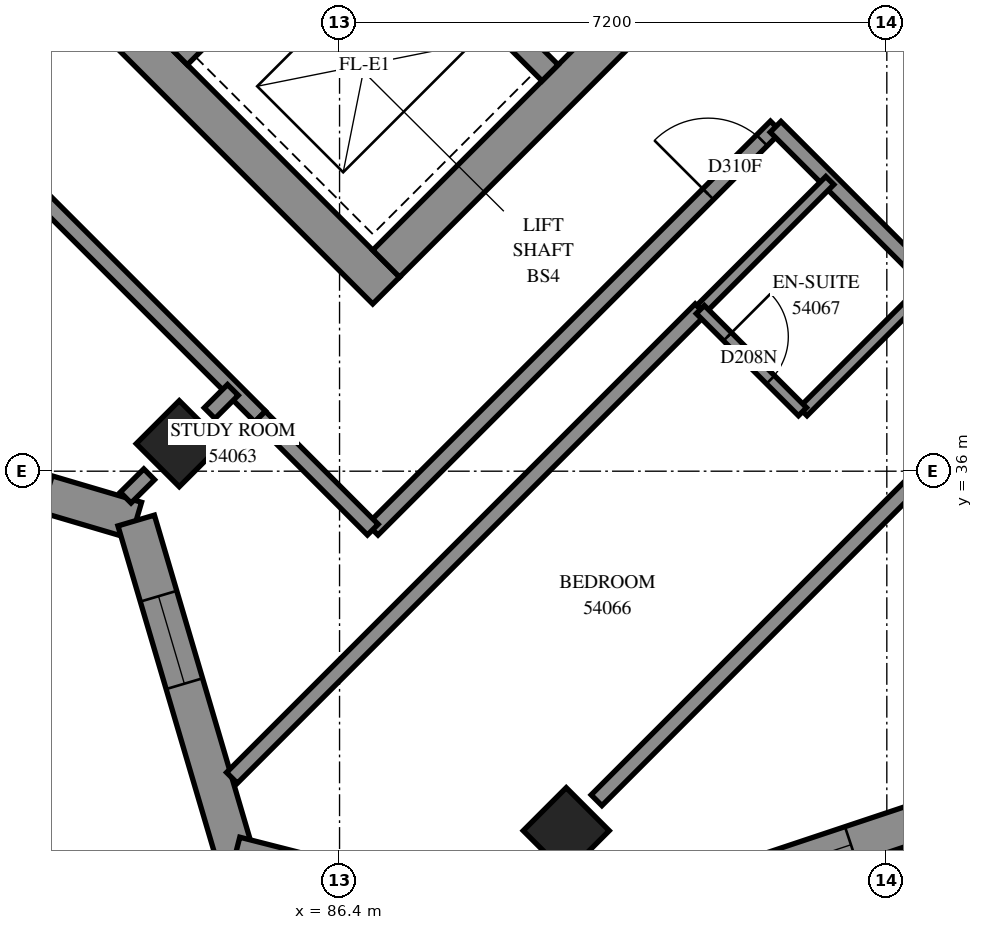
"""IFC4 building model, lengths in metres.
Left out: names, types, materials, properties, quantities, classifications, styles, units other than length and angle.
Written with IfcOpenShell. Run it as: python <this file> out.ifc"""

import sys

from ifc_helpers import new_model, si_unit, direction, frame, frame_2d, origin, origin_2d, place, context, subcontext, project, spatial, polyline, rectangle, outline, extrude, element, fill, save


model = new_model("IFC4")
c1 = context("Model", 3, precision=1e-05, world=origin(), true_north=direction((0.0, 1.0)))
c2 = subcontext(c1, "Body", "Model", "MODEL_VIEW")
j1 = project(units=[si_unit("LENGTHUNIT", "METRE"), si_unit("PLANEANGLEUNIT", "RADIAN")], contexts=[c1])
p1 = place(None, origin())
s1 = spatial("IfcSite", under=j1, at=p1, CompositionType="ELEMENT")
p2 = place(p1, origin())
s2 = spatial("IfcBuilding", under=s1, at=p2, CompositionType="ELEMENT")
p3 = place(p2, frame((0.0, 0.0, 199.8)))
s3 = spatial("IfcBuildingStorey", under=s2, at=p3, CompositionType="ELEMENT", Elevation=199.8)
for number, where, z_axis, x_axis in (
    (1, (84.291, 36.362, 0.0), (0.0, 0.0, 1.0), (0.707, -0.707, 0.0)),
    (2, (89.382, 31.271, 0.0), (0.0, 0.0, 1.0), (0.707, -0.707, 0.0)),
):
    element("IfcColumn", number, at=place(p3, frame(where, z_axis=z_axis, x_axis=x_axis)), inside=s3, PredefinedType="COLUMN", context=c2, shape_type="SweptSolid", body=[
        extrude(rectangle(XDim=0.8, YDim=0.8, at=origin_2d()), origin(), (0.0, 0.0, 1.0), 3.1),
    ])
p4 = place(p3, frame((76.124, 49.267, -0.3), z_axis=(0.0, 0.0, 1.0), x_axis=(0.7071067812, -0.7071067812, 0.0)))
e3 = element("IfcWall", 3, at=p4, inside=s3, PredefinedType="SHEAR", context=c2, shape_type="SweptSolid", body=[
    extrude(rectangle(XDim=15.4, YDim=0.5, at=frame_2d((7.7, 0.0))), origin(), (0.0, 0.0, 1.0), 2.7),
])
p5 = place(p3, frame((87.013, 38.731, -0.3), z_axis=(0.0, 0.0, 1.0), x_axis=(0.7071067812, 0.7071067812, 0.0)))
e4 = element("IfcWall", 4, at=p5, inside=s3, PredefinedType="SHEAR", context=c2, shape_type="SweptSolid", body=[
    extrude(rectangle(XDim=14.4, YDim=0.5, at=frame_2d((7.2, 0.0))), origin(), (0.0, 0.0, 1.0), 2.7),
])
p6 = place(p5, frame((4.55, 0.0, 0.3)))
e5 = element("IfcOpeningElement", 5, at=p6, cuts=e4, PredefinedType="OPENING", context=c2, shape_type="SweptSolid", body=[
    extrude(rectangle(XDim=1.1, YDim=2.1, at=frame_2d((0.55, 1.05))), frame((0.0, 0.26, 0.0), z_axis=(0.0, -1.0, 0.0), x_axis=(1.0, 0.0, 0.0)), (0.0, 0.0, 1.0), 0.52),
])
p7 = place(p5, frame((11.35, 0.0, 0.3)))
e6 = element("IfcOpeningElement", 6, at=p7, cuts=e4, PredefinedType="OPENING", context=c2, shape_type="SweptSolid", body=[
    extrude(rectangle(XDim=1.1, YDim=2.1, at=frame_2d((0.55, 1.05))), frame((0.0, 0.26, 0.0), z_axis=(0.0, -1.0, 0.0), x_axis=(1.0, 0.0, 0.0)), (0.0, 0.0, 1.0), 0.52),
])
p8 = place(p3, frame((84.291, 41.453, 0.0), z_axis=(0.0, 0.0, 1.0), x_axis=(0.7071067812, 0.7071067812, 0.0)))
e7 = element("IfcWall", 7, at=p8, inside=s3, PredefinedType="SOLIDWALL", context=c2, shape_type="SweptSolid", body=[
    extrude(rectangle(XDim=3.3, YDim=0.3, at=frame_2d((1.65, 0.0))), origin(), (0.0, 0.0, 1.0), 3.1),
])
p9 = place(p3, frame((78.988, 51.423, 0.0), z_axis=(0.0, 0.0, 1.0), x_axis=(0.7071067812, -0.7071067812, 0.0)))
e8 = element("IfcWall", 8, at=p9, inside=s3, PredefinedType="SOLIDWALL", context=c2, shape_type="SweptSolid", body=[
    extrude(rectangle(XDim=14.4, YDim=0.3, at=frame_2d((7.2, 0.0))), origin(), (0.0, 0.0, 1.0), 3.1),
])
p10 = place(p9, frame((1.35, 0.0, 0.0)))
e9 = element("IfcOpeningElement", 9, at=p10, cuts=e8, PredefinedType="OPENING", context=c2, shape_type="SweptSolid", body=[
    extrude(rectangle(XDim=0.9, YDim=2.1, at=frame_2d((0.45, 1.05))), frame((0.0, 0.16, 0.0), z_axis=(0.0, -1.0, 0.0), x_axis=(1.0, 0.0, 0.0)), (0.0, 0.0, 1.0), 0.32),
])
p11 = place(p9, frame((4.95, 0.0, 0.0)))
e10 = element("IfcOpeningElement", 10, at=p11, cuts=e8, PredefinedType="OPENING", context=c2, shape_type="SweptSolid", body=[
    extrude(rectangle(XDim=0.9, YDim=2.1, at=frame_2d((0.45, 1.05))), frame((0.0, 0.16, 0.0), z_axis=(0.0, -1.0, 0.0), x_axis=(1.0, 0.0, 0.0)), (0.0, 0.0, 1.0), 0.32),
])
p12 = place(p9, frame((8.55, 0.0, 0.0)))
e11 = element("IfcOpeningElement", 11, at=p12, cuts=e8, PredefinedType="OPENING", context=c2, shape_type="SweptSolid", body=[
    extrude(rectangle(XDim=0.9, YDim=2.1, at=frame_2d((0.45, 1.05))), frame((0.0, 0.16, 0.0), z_axis=(0.0, -1.0, 0.0), x_axis=(1.0, 0.0, 0.0)), (0.0, 0.0, 1.0), 0.32),
])
p13 = place(p9, frame((12.05, 0.0, 0.0)))
e12 = element("IfcOpeningElement", 12, at=p13, cuts=e8, PredefinedType="OPENING", context=c2, shape_type="SweptSolid", body=[
    extrude(rectangle(XDim=1.1, YDim=2.1, at=frame_2d((0.55, 1.05))), frame((0.0, 0.16, 0.0), z_axis=(0.0, -1.0, 0.0), x_axis=(1.0, 0.0, 0.0)), (0.0, 0.0, 1.0), 0.32),
])
p14 = place(p3, frame((89.373, 29.834, 0.0), z_axis=(0.0, 0.0, 1.0), x_axis=(0.9486871639, 0.3162161681, 0.0)))
e13 = element("IfcWall", 13, at=p14, inside=s3, PredefinedType="SOLIDWALL", context=c2, shape_type="SweptSolid", body=[
    extrude(outline(polyline([(-0.073, -0.25), (5.293, -0.25), (5.054, 0.25), (0.073, 0.25), (-0.073, -0.25)])), origin(), (0.0, 0.0, 1.0), 3.1),
])
p15 = place(p14, frame((1.158, 0.0, 0.45)))
e14 = element("IfcOpeningElement", 14, at=p15, cuts=e13, PredefinedType="OPENING", context=c2, shape_type="SweptSolid", body=[
    extrude(rectangle(XDim=1.3, YDim=2.5, at=frame_2d((0.65, 1.25))), frame((0.0, 0.26, 0.0), z_axis=(0.0, -1.0, 0.0), x_axis=(1.0, 0.0, 0.0)), (0.0, 0.0, 1.0), 0.52),
])
p16 = place(p14, frame((2.658, 0.0, 0.45)))
e15 = element("IfcOpeningElement", 15, at=p16, cuts=e13, PredefinedType="OPENING", context=c2, shape_type="SweptSolid", body=[
    extrude(rectangle(XDim=1.3, YDim=2.5, at=frame_2d((0.65, 1.25))), frame((0.0, 0.26, 0.0), z_axis=(0.0, -1.0, 0.0), x_axis=(1.0, 0.0, 0.0)), (0.0, 0.0, 1.0), 0.52),
])
p17 = place(p3, frame((79.316, 36.653, 0.0), z_axis=(0.0, 0.0, 1.0), x_axis=(0.9590792188, -0.2831378676, 0.0)))
e16 = element("IfcWall", 16, at=p17, inside=s3, PredefinedType="SOLIDWALL", context=c2, shape_type="SweptSolid", body=[
    extrude(outline(polyline([(-0.142, -0.25), (4.461, -0.25), (4.733, 0.25), (0.142, 0.25), (-0.142, -0.25)])), origin(), (0.0, 0.0, 1.0), 3.1),
])
p18 = place(p17, frame((0.588, 0.0, 0.45)))
e17 = element("IfcOpeningElement", 17, at=p18, cuts=e16, PredefinedType="OPENING", context=c2, shape_type="SweptSolid", body=[
    extrude(rectangle(XDim=1.3, YDim=2.5, at=frame_2d((0.65, 1.25))), frame((0.0, 0.26, 0.0), z_axis=(0.0, -1.0, 0.0), x_axis=(1.0, 0.0, 0.0)), (0.0, 0.0, 1.0), 0.52),
])
p19 = place(p17, frame((2.087, 0.0, 0.45)))
e18 = element("IfcOpeningElement", 18, at=p19, cuts=e16, PredefinedType="OPENING", context=c2, shape_type="SweptSolid", body=[
    extrude(rectangle(XDim=1.3, YDim=2.5, at=frame_2d((0.65, 1.25))), frame((0.0, 0.26, 0.0), z_axis=(0.0, -1.0, 0.0), x_axis=(1.0, 0.0, 0.0)), (0.0, 0.0, 1.0), 0.52),
])
p20 = place(p3, frame((83.724, 35.351, 0.0), z_axis=(0.0, 0.0, 1.0), x_axis=(0.2831378676, -0.9590792188, 0.0)))
e19 = element("IfcWall", 19, at=p20, inside=s3, PredefinedType="SOLIDWALL", context=c2, shape_type="SweptSolid", body=[
    extrude(outline(polyline([(0.136, -0.25), (4.739, -0.25), (4.455, 0.25), (-0.136, 0.25), (0.136, -0.25)])), origin(), (0.0, 0.0, 1.0), 3.1),
])
p21 = place(p20, frame((1.038, 0.0, 0.45)))
e20 = element("IfcOpeningElement", 20, at=p21, cuts=e19, PredefinedType="OPENING", context=c2, shape_type="SweptSolid", body=[
    extrude(rectangle(XDim=1.2, YDim=2.5, at=frame_2d((0.6, 1.25))), frame((0.0, 0.26, 0.0), z_axis=(0.0, -1.0, 0.0), x_axis=(1.0, 0.0, 0.0)), (0.0, 0.0, 1.0), 0.52),
])
p22 = place(p3, frame((85.026, 30.942, 0.0), z_axis=(0.0, 0.0, 1.0), x_axis=(0.9689909926, -0.2470960468, 0.0)))
e21 = element("IfcWall", 21, at=p22, inside=s3, PredefinedType="SOLIDWALL", context=c2, shape_type="SweptSolid", body=[
    extrude(outline(polyline([(-0.142, -0.25), (4.56, -0.25), (4.413, 0.25), (0.142, 0.25), (-0.142, -0.25)])), origin(), (0.0, 0.0, 1.0), 3.1),
])
p23 = place(p22, frame((2.115, 0.0, 0.45)))
e22 = element("IfcOpeningElement", 22, at=p23, cuts=e21, PredefinedType="OPENING", context=c2, shape_type="SweptSolid", body=[
    extrude(rectangle(XDim=1.2, YDim=2.5, at=frame_2d((0.6, 1.25))), frame((0.0, 0.26, 0.0), z_axis=(0.0, -1.0, 0.0), x_axis=(1.0, 0.0, 0.0)), (0.0, 0.0, 1.0), 0.52),
])
p24 = place(p3, frame((84.984, 31.966, 0.0), z_axis=(0.0, 0.0, 1.0), x_axis=(0.7071067812, 0.7071067812, 0.0)))
e23 = element("IfcWall", 23, at=p24, inside=s3, PredefinedType="PARTITIONING", context=c2, shape_type="SweptSolid", body=[
    extrude(rectangle(XDim=8.719, YDim=0.2, at=frame_2d((4.359, 0.0))), origin(), (0.0, 0.0, 1.0), 3.1),
])
p25 = place(p3, frame((86.835, 35.231, 0.0), z_axis=(0.0, 0.0, 1.0), x_axis=(0.7071067812, 0.7071067812, 0.0)))
e24 = element("IfcWall", 24, at=p25, inside=s3, PredefinedType="PARTITIONING", context=c2, shape_type="SweptSolid", body=[
    extrude(rectangle(XDim=7.501, YDim=0.2, at=frame_2d((3.751, 0.0))), origin(), (0.0, 0.0, 1.0), 3.1),
])
p26 = place(p25, frame((6.243, 0.0, 0.0)))
e25 = element("IfcOpeningElement", 25, at=p26, cuts=e24, PredefinedType="OPENING", context=c2, shape_type="SweptSolid", body=[
    extrude(rectangle(XDim=1.0, YDim=2.1, at=frame_2d((0.5, 1.05))), frame((0.0, 0.11, 0.0), z_axis=(0.0, -1.0, 0.0), x_axis=(1.0, 0.0, 0.0)), (0.0, 0.0, 1.0), 0.22),
])
p27 = place(p3, frame((80.522, 41.553, 0.0), z_axis=(0.0, 0.0, 1.0), x_axis=(0.7071067812, -0.7071067812, 0.0)))
e26 = element("IfcWall", 26, at=p27, inside=s3, PredefinedType="PARTITIONING", context=c2, shape_type="SweptSolid", body=[
    extrude(rectangle(XDim=6.836, YDim=0.2, at=frame_2d((3.418, 0.0))), origin(), (0.0, 0.0, 1.0), 3.1),
])
p28 = place(p3, frame((89.781, 31.671, 0.0), z_axis=(0.0, 0.0, 1.0), x_axis=(0.7071067812, 0.7071067812, 0.0)))
e27 = element("IfcWall", 27, at=p28, inside=s3, PredefinedType="PARTITIONING", context=c2, shape_type="SweptSolid", body=[
    extrude(rectangle(XDim=6.07, YDim=0.2, at=frame_2d((3.035, 0.0))), origin(), (0.0, 0.0, 1.0), 2.6),
])
p29 = place(p3, frame((93.693, 42.085, 0.0), z_axis=(0.0, 0.0, 1.0), x_axis=(0.7071067812, -0.7071067812, 0.0)))
e28 = element("IfcWall", 28, at=p29, inside=s3, PredefinedType="PARTITIONING", context=c2, shape_type="SweptSolid", body=[
    extrude(rectangle(XDim=4.599, YDim=0.2, at=frame_2d((2.3, 0.0))), origin(), (0.0, 0.0, 1.0), 3.1),
])
p30 = place(p29, frame((1.349, 0.0, 0.0)))
e29 = element("IfcOpeningElement", 29, at=p30, cuts=e28, PredefinedType="OPENING", context=c2, shape_type="SweptSolid", body=[
    extrude(rectangle(XDim=0.9, YDim=2.1, at=frame_2d((0.45, 1.05))), frame((0.0, 0.11, 0.0), z_axis=(0.0, -1.0, 0.0), x_axis=(1.0, 0.0, 0.0)), (0.0, 0.0, 1.0), 0.22),
])
p31 = place(p3, frame((92.137, 40.531, 0.0), z_axis=(0.0, 0.0, 1.0), x_axis=(0.7071067812, -0.7071067812, 0.0)))
e30 = element("IfcWall", 30, at=p31, inside=s3, PredefinedType="PARTITIONING", context=c2, shape_type="SweptSolid", body=[
    extrude(rectangle(XDim=4.599, YDim=0.2, at=frame_2d((2.3, 0.0))), origin(), (0.0, 0.0, 1.0), 3.1),
])
p32 = place(p31, frame((3.083, 0.0, 0.0)))
e31 = element("IfcOpeningElement", 31, at=p32, cuts=e30, PredefinedType="OPENING", context=c2, shape_type="SweptSolid", body=[
    extrude(rectangle(XDim=0.9, YDim=2.1, at=frame_2d((0.45, 1.05))), frame((0.0, 0.11, 0.0), z_axis=(0.0, -1.0, 0.0), x_axis=(1.0, 0.0, 0.0)), (0.0, 0.0, 1.0), 0.22),
])
for number, where, z_axis, x_axis in (
    (32, (91.152, 38.128, 0.0), (0.0, 0.0, 1.0), (0.708, 0.707, 0.0)),
    (33, (92.497, 36.783, 0.0), (0.0, 0.0, 1.0), (0.707, 0.708, 0.0)),
):
    element("IfcWall", number, at=place(p3, frame(where, z_axis=z_axis, x_axis=x_axis)), inside=s3, PredefinedType="PARTITIONING", context=c2, shape_type="SweptSolid", body=[
        extrude(rectangle(XDim=2.4, YDim=0.15, at=frame_2d((1.2, 0.0))), origin(), (0.0, 0.0, 1.0), 3.1),
    ])
p33 = place(p3, frame((85.353, 36.717, 0.0), z_axis=(0.0, 0.0, 1.0), x_axis=(0.7066304548, -0.7075827869, 0.0)))
e34 = element("IfcWall", 34, at=p33, inside=s3, PredefinedType="PARTITIONING", context=c2, shape_type="SweptSolid", body=[
    extrude(rectangle(XDim=2.1, YDim=0.2, at=frame_2d((1.05, 0.0))), origin(), (0.0, 0.0, 1.0), 3.1),
])
p34 = place(p3, frame((91.147, 38.127, 0.0), z_axis=(0.0, 0.0, 1.0), x_axis=(0.7071067812, -0.7071067812, 0.0)))
e35 = element("IfcWall", 35, at=p34, inside=s3, PredefinedType="PARTITIONING", context=c2, shape_type="SweptSolid", body=[
    extrude(rectangle(XDim=1.901, YDim=0.15, at=frame_2d((0.95, 0.0))), origin(), (0.0, 0.0, 1.0), 3.1),
])
p35 = place(p34, frame((0.506, 0.0, 0.0)))
e36 = element("IfcOpeningElement", 36, at=p35, cuts=e35, PredefinedType="OPENING", context=c2, shape_type="SweptSolid", body=[
    extrude(rectangle(XDim=0.8, YDim=2.1, at=frame_2d((0.4, 1.05))), frame((0.0, 0.085, 0.0), z_axis=(0.0, -1.0, 0.0), x_axis=(1.0, 0.0, 0.0)), (0.0, 0.0, 1.0), 0.17),
])
p36 = place(p3, frame((84.691, 36.763, 0.0), z_axis=(0.0, 0.0, 1.0), x_axis=(0.7071067812, 0.7071067812, 0.0)))
e37 = element("IfcWall", 37, at=p36, inside=s3, PredefinedType="PARTITIONING", context=c2, shape_type="SweptSolid", body=[
    extrude(rectangle(XDim=0.433, YDim=0.2, at=frame_2d((0.216, 0.0))), origin(), (0.0, 0.0, 1.0), 3.1),
])
p37 = place(p3, frame((83.587, 35.653, 0.0), z_axis=(0.0, 0.0, 1.0), x_axis=(0.7098608171, 0.7043419769, 0.0)))
e38 = element("IfcWall", 38, at=p37, inside=s3, PredefinedType="PARTITIONING", context=c2, shape_type="SweptSolid", body=[
    extrude(rectangle(XDim=0.435, YDim=0.2, at=frame_2d((0.217, 0.0))), origin(), (0.0, 0.0, 1.0), 3.1),
])
p38 = place(p16, origin())
e39 = element("IfcWindow", 39, at=p38, inside=s3, PartitioningType="SINGLE_PANEL", PredefinedType="WINDOW", context=c2, shape_type="SweptSolid", body=[
    extrude(rectangle(XDim=1.3, YDim=2.5, at=frame_2d((0.65, 1.25))), frame((0.0, 0.18, 0.0), z_axis=(0.0, -1.0, 0.0), x_axis=(1.0, 0.0, 0.0)), (0.0, 0.0, 1.0), 0.06),
])
fill(e15, e39)
p39 = place(p21, origin())
e40 = element("IfcWindow", 40, at=p39, inside=s3, PartitioningType="SINGLE_PANEL", PredefinedType="WINDOW", context=c2, shape_type="SweptSolid", body=[
    extrude(rectangle(XDim=1.2, YDim=2.5, at=frame_2d((0.6, 1.25))), frame((0.0, 0.18, 0.0), z_axis=(0.0, -1.0, 0.0), x_axis=(1.0, 0.0, 0.0)), (0.0, 0.0, 1.0), 0.06),
])
fill(e20, e40)
p40 = place(p26, origin())
e41 = element("IfcDoor", 41, at=p40, inside=s3, OperationType="SINGLE_SWING_RIGHT", PredefinedType="DOOR", context=c2, shape_type="SweptSolid", body=[
    extrude(rectangle(XDim=1.0, YDim=2.1, at=frame_2d((0.5, 1.05))), frame((0.0, 0.025, 0.0), z_axis=(0.0, -1.0, 0.0), x_axis=(1.0, 0.0, 0.0)), (0.0, 0.0, 1.0), 0.05),
])
fill(e25, e41)
p41 = place(p35, origin())
e42 = element("IfcDoor", 42, at=p41, inside=s3, OperationType="SINGLE_SWING_RIGHT", PredefinedType="DOOR", context=c2, shape_type="SweptSolid", body=[
    extrude(rectangle(XDim=0.8, YDim=2.1, at=frame_2d((0.4, 1.05))), frame((0.0, 0.025, 0.0), z_axis=(0.0, -1.0, 0.0), x_axis=(1.0, 0.0, 0.0)), (0.0, 0.0, 1.0), 0.05),
])
fill(e36, e42)
save(model, sys.argv[1])
